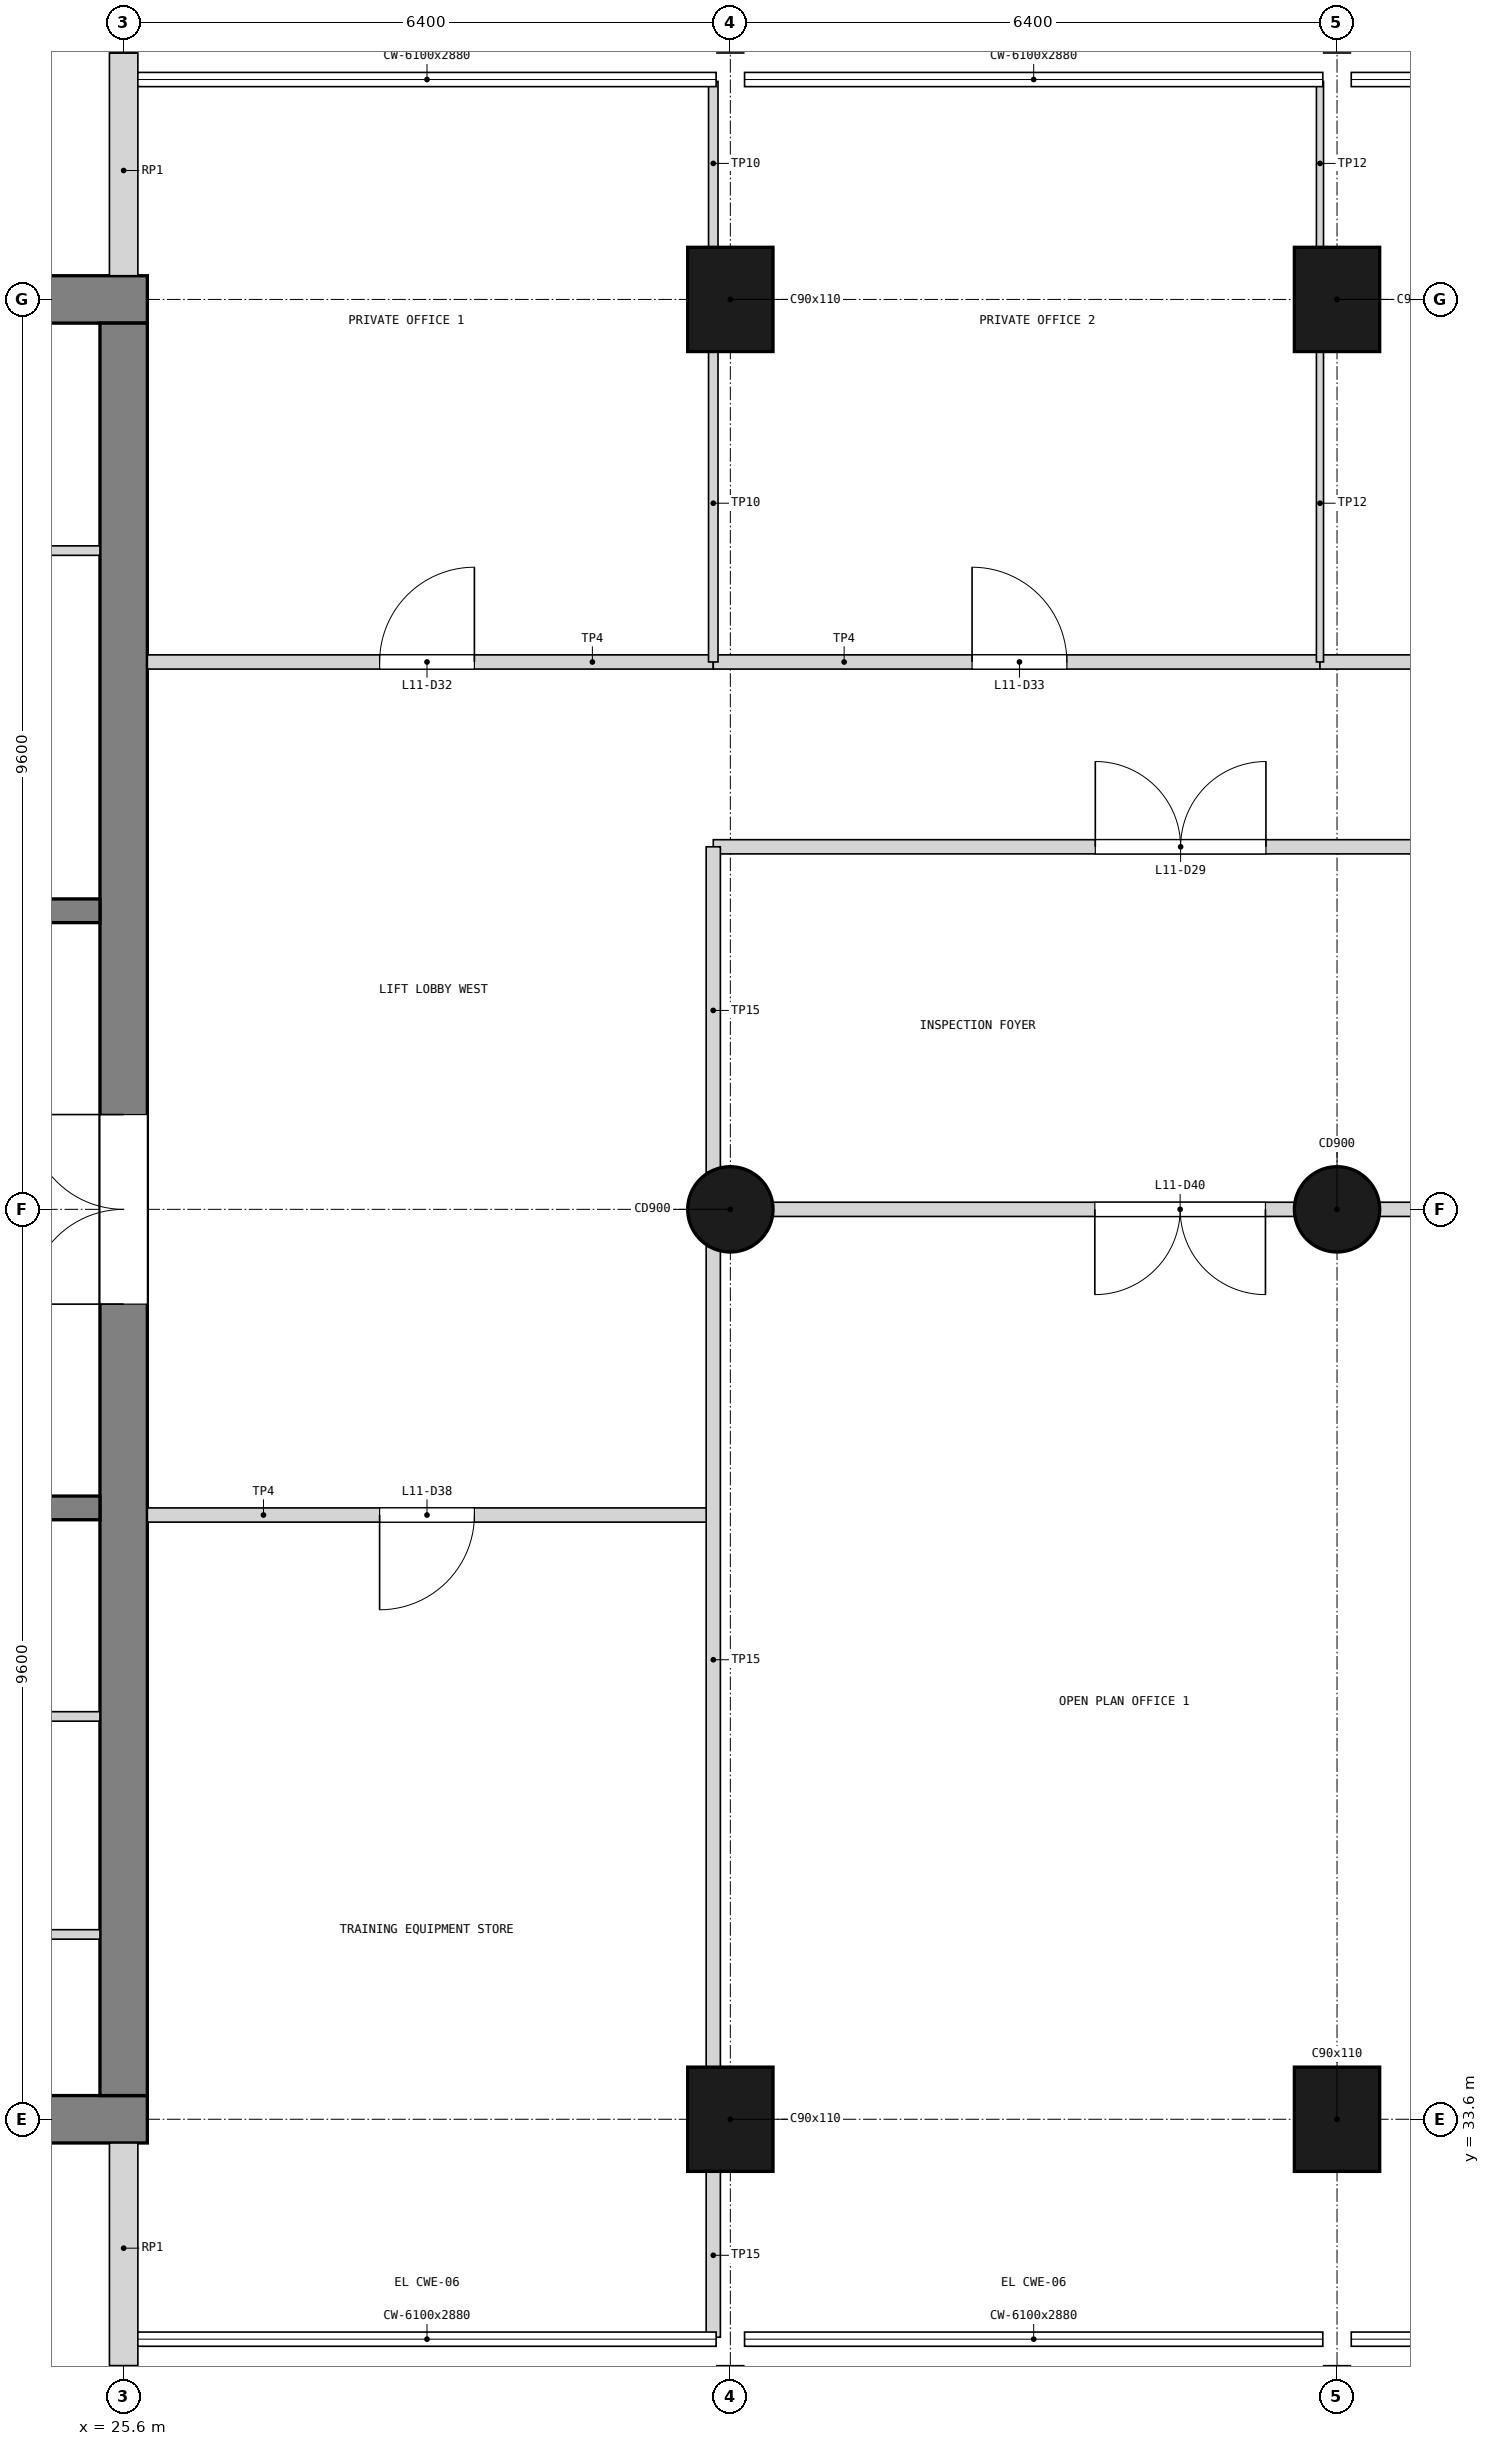
"""IFC4 building model, lengths in metres.
Left out: names, types, materials, properties, quantities, classifications, styles, units other than length and angle.
Written with IfcOpenShell. Run it as: python <this file> out.ifc"""

import sys

from ifc_helpers import new_model, si_unit, direction, frame, frame_2d, origin, origin_2d, place, context, subcontext, project, spatial, rectangle, circle, extrude, element, fill, save


model = new_model("IFC4")
c1 = context("Model", 3, precision=1e-05, world=origin(), true_north=direction((0.0, 1.0)))
c2 = subcontext(c1, "Body", "Model", "MODEL_VIEW")
j1 = project(units=[si_unit("LENGTHUNIT", "METRE"), si_unit("PLANEANGLEUNIT", "RADIAN")], contexts=[c1])
p1 = place(None, origin())
s1 = spatial("IfcSite", under=j1, at=p1, CompositionType="ELEMENT")
p2 = place(p1, origin())
s2 = spatial("IfcBuilding", under=s1, at=p2, CompositionType="ELEMENT")
p3 = place(p2, frame((0.0, 0.0, 44.4)))
s3 = spatial("IfcBuildingStorey", under=s2, at=p3, CompositionType="ELEMENT", Elevation=44.4)
p4 = place(p3, frame((12.55, 52.8, 0.0), z_axis=(0.0, 0.0, 1.0), x_axis=(1.0, 0.0, 0.0)))
e1 = element("IfcWall", 1, at=p4, inside=s3, PredefinedType="SHEAR", context=c2, shape_type="SweptSolid", body=[
    extrude(rectangle(XDim=13.3, YDim=0.5, at=frame_2d((6.65, 0.0))), origin(), (0.0, 0.0, 1.0), 3.9),
])
p5 = place(p4, frame((1.85, 0.0, 1.0)))
e2 = element("IfcOpeningElement", 2, at=p5, cuts=e1, PredefinedType="OPENING", context=c2, shape_type="SweptSolid", body=[
    extrude(rectangle(XDim=0.4, YDim=2.0, at=frame_2d((0.2, 1.0))), frame((0.0, 0.26, 0.0), z_axis=(0.0, -1.0, 0.0), x_axis=(1.0, 0.0, 0.0)), (0.0, 0.0, 1.0), 0.52),
])
p6 = place(p3, frame((12.55, 33.6, 0.0), z_axis=(0.0, 0.0, 1.0), x_axis=(1.0, 0.0, 0.0)))
e3 = element("IfcWall", 3, at=p6, inside=s3, PredefinedType="SHEAR", context=c2, shape_type="SweptSolid", body=[
    extrude(rectangle(XDim=13.3, YDim=0.5, at=frame_2d((6.65, 0.0))), origin(), (0.0, 0.0, 1.0), 3.9),
])
p7 = place(p6, frame((1.85, 0.0, 1.0)))
e4 = element("IfcOpeningElement", 4, at=p7, cuts=e3, PredefinedType="OPENING", context=c2, shape_type="SweptSolid", body=[
    extrude(rectangle(XDim=0.4, YDim=2.0, at=frame_2d((0.2, 1.0))), frame((0.0, 0.26, 0.0), z_axis=(0.0, -1.0, 0.0), x_axis=(1.0, 0.0, 0.0)), (0.0, 0.0, 1.0), 0.52),
])
p8 = place(p3, frame((25.6, 33.85, 0.0), z_axis=(0.0, 0.0, 1.0), x_axis=(0.0, 1.0, 0.0)))
e5 = element("IfcWall", 5, at=p8, inside=s3, PredefinedType="SHEAR", context=c2, shape_type="SweptSolid", body=[
    extrude(rectangle(XDim=18.7, YDim=0.5, at=frame_2d((9.35, 0.0))), origin(), (0.0, 0.0, 1.0), 3.9),
])
p9 = place(p8, frame((8.35, 0.0, 0.0)))
e6 = element("IfcOpeningElement", 6, at=p9, cuts=e5, PredefinedType="OPENING", context=c2, shape_type="SweptSolid", body=[
    extrude(rectangle(XDim=2.0, YDim=2.1, at=frame_2d((1.0, 1.05))), frame((0.0, 0.26, 0.0), z_axis=(0.0, -1.0, 0.0), x_axis=(1.0, 0.0, 0.0)), (0.0, 0.0, 1.0), 0.52),
])
p10 = place(p3, frame((32.0, 33.6, 0.0), z_axis=(0.0, 0.0, 1.0), x_axis=(1.0, 0.0, 0.0)))
e7 = element("IfcColumn", 7, at=p10, inside=s3, PredefinedType="COLUMN", context=c2, shape_type="SweptSolid", body=[
    extrude(rectangle(XDim=0.9, YDim=1.1, at=origin_2d()), origin(), (0.0, 0.0, 1.0), 3.9),
])
p11 = place(p3, frame((32.0, 43.2, 0.0), z_axis=(0.0, 0.0, 1.0), x_axis=(1.0, 0.0, 0.0)))
e8 = element("IfcColumn", 8, at=p11, inside=s3, PredefinedType="COLUMN", context=c2, shape_type="SweptSolid", body=[
    extrude(circle(Radius=0.45, at=origin_2d()), origin(), (0.0, 0.0, 1.0), 3.9),
])
for number, where, z_axis, x_axis in (
    (9, (32.0, 52.8, 0.0), (0.0, 0.0, 1.0), (1.0, 0.0, 0.0)),
    (10, (38.4, 33.6, 0.0), (0.0, 0.0, 1.0), (1.0, 0.0, 0.0)),
):
    element("IfcColumn", number, at=place(p3, frame(where, z_axis=z_axis, x_axis=x_axis)), inside=s3, PredefinedType="COLUMN", context=c2, shape_type="SweptSolid", body=[
        extrude(rectangle(XDim=0.9, YDim=1.1, at=origin_2d()), origin(), (0.0, 0.0, 1.0), 3.9),
    ])
p12 = place(p3, frame((38.4, 43.2, 0.0), z_axis=(0.0, 0.0, 1.0), x_axis=(1.0, 0.0, 0.0)))
e11 = element("IfcColumn", 11, at=p12, inside=s3, PredefinedType="COLUMN", context=c2, shape_type="SweptSolid", body=[
    extrude(circle(Radius=0.45, at=origin_2d()), origin(), (0.0, 0.0, 1.0), 3.9),
])
p13 = place(p3, frame((38.4, 52.8, 0.0), z_axis=(0.0, 0.0, 1.0), x_axis=(1.0, 0.0, 0.0)))
e12 = element("IfcColumn", 12, at=p13, inside=s3, PredefinedType="COLUMN", context=c2, shape_type="SweptSolid", body=[
    extrude(rectangle(XDim=0.9, YDim=1.1, at=origin_2d()), origin(), (0.0, 0.0, 1.0), 3.9),
])
p14 = place(p3, frame((25.6, 31.0, 0.0), z_axis=(0.0, 0.0, 1.0), x_axis=(0.0, 1.0, 0.0)))
e13 = element("IfcWall", 13, at=p14, inside=s3, PredefinedType="SOLIDWALL", context=c2, shape_type="SweptSolid", body=[
    extrude(rectangle(XDim=2.35, YDim=0.3, at=frame_2d((1.175, 0.0))), origin(), (0.0, 0.0, 1.0), 2.88),
])
p15 = place(p3, frame((25.6, 53.05, 0.0), z_axis=(0.0, 0.0, 1.0), x_axis=(0.0, 1.0, 0.0)))
e14 = element("IfcWall", 14, at=p15, inside=s3, PredefinedType="SOLIDWALL", context=c2, shape_type="SweptSolid", body=[
    extrude(rectangle(XDim=2.35, YDim=0.3, at=frame_2d((1.175, 0.0))), origin(), (0.0, 0.0, 1.0), 2.88),
])
for number, where, z_axis, x_axis in (
    (15, (19.875, 40.05, 0.0), (0.0, 0.0, 1.0), (1.0, 0.0, 0.0)),
    (16, (19.875, 46.35, 0.0), (0.0, 0.0, 1.0), (1.0, 0.0, 0.0)),
):
    element("IfcWall", number, at=place(p3, frame(where, z_axis=z_axis, x_axis=x_axis)), inside=s3, PredefinedType="SOLIDWALL", context=c2, shape_type="SweptSolid", body=[
        extrude(rectangle(XDim=5.475, YDim=0.25, at=frame_2d((2.738, 0.0))), origin(), (0.0, 0.0, 1.0), 3.6),
    ])
p16 = place(p3, frame((20.125, 35.55, 0.0), z_axis=(0.0, 0.0, 1.0), x_axis=(1.0, 0.0, 0.0)))
e17 = element("IfcWall", 17, at=p16, inside=s3, PredefinedType="PARTITIONING", context=c2, shape_type="SweptSolid", body=[
    extrude(rectangle(XDim=5.225, YDim=0.1, at=frame_2d((2.613, 0.0))), origin(), (0.0, 0.0, 1.0), 3.6),
])
p17 = place(p3, frame((21.675, 37.85, 0.0), z_axis=(0.0, 0.0, 1.0), x_axis=(1.0, 0.0, 0.0)))
e18 = element("IfcWall", 18, at=p17, inside=s3, PredefinedType="PARTITIONING", context=c2, shape_type="SweptSolid", body=[
    extrude(rectangle(XDim=3.675, YDim=0.1, at=frame_2d((1.837, 0.0))), origin(), (0.0, 0.0, 1.0), 3.6),
])
p18 = place(p3, frame((20.125, 50.15, 0.0), z_axis=(0.0, 0.0, 1.0), x_axis=(1.0, 0.0, 0.0)))
e19 = element("IfcWall", 19, at=p18, inside=s3, PredefinedType="PARTITIONING", context=c2, shape_type="SweptSolid", body=[
    extrude(rectangle(XDim=5.225, YDim=0.1, at=frame_2d((2.613, 0.0))), origin(), (0.0, 0.0, 1.0), 3.6),
])
p19 = place(p3, frame((31.82, 47.025, 0.0), z_axis=(0.0, 0.0, 1.0), x_axis=(1.0, 0.0, 0.0)))
e20 = element("IfcWall", 20, at=p19, inside=s3, PredefinedType="PARTITIONING", context=c2, shape_type="SweptSolid", body=[
    extrude(rectangle(XDim=19.56, YDim=0.15, at=frame_2d((9.78, 0.0))), origin(), (0.0, 0.0, 1.0), 3.68),
])
p20 = place(p19, frame((4.03, 0.0, 0.0)))
e21 = element("IfcOpeningElement", 21, at=p20, cuts=e20, PredefinedType="OPENING", context=c2, shape_type="SweptSolid", body=[
    extrude(rectangle(XDim=1.8, YDim=2.1, at=frame_2d((0.9, 1.05))), frame((0.0, 0.085, 0.0), z_axis=(0.0, -1.0, 0.0), x_axis=(1.0, 0.0, 0.0)), (0.0, 0.0, 1.0), 0.17),
])
p21 = place(p19, frame((13.73, 0.0, 0.0)))
e22 = element("IfcOpeningElement", 22, at=p21, cuts=e20, PredefinedType="OPENING", context=c2, shape_type="SweptSolid", body=[
    extrude(rectangle(XDim=1.8, YDim=2.1, at=frame_2d((0.9, 1.05))), frame((0.0, 0.085, 0.0), z_axis=(0.0, -1.0, 0.0), x_axis=(1.0, 0.0, 0.0)), (0.0, 0.0, 1.0), 0.17),
])
p22 = place(p3, frame((25.85, 48.975, 0.0), z_axis=(0.0, 0.0, 1.0), x_axis=(1.0, 0.0, 0.0)))
e23 = element("IfcWall", 23, at=p22, inside=s3, PredefinedType="PARTITIONING", context=c2, shape_type="SweptSolid", body=[
    extrude(rectangle(XDim=5.97, YDim=0.15, at=frame_2d((2.985, 0.0))), origin(), (0.0, 0.0, 1.0), 3.68),
])
p23 = place(p22, frame((2.45, 0.0, 0.0)))
e24 = element("IfcOpeningElement", 24, at=p23, cuts=e23, PredefinedType="OPENING", context=c2, shape_type="SweptSolid", body=[
    extrude(rectangle(XDim=1.0, YDim=2.1, at=frame_2d((0.5, 1.05))), frame((0.0, 0.085, 0.0), z_axis=(0.0, -1.0, 0.0), x_axis=(1.0, 0.0, 0.0)), (0.0, 0.0, 1.0), 0.17),
])
p24 = place(p3, frame((31.82, 48.975, 0.0), z_axis=(0.0, 0.0, 1.0), x_axis=(1.0, 0.0, 0.0)))
e25 = element("IfcWall", 25, at=p24, inside=s3, PredefinedType="PARTITIONING", context=c2, shape_type="SweptSolid", body=[
    extrude(rectangle(XDim=6.4, YDim=0.15, at=frame_2d((3.2, 0.0))), origin(), (0.0, 0.0, 1.0), 3.68),
])
p25 = place(p24, frame((2.73, 0.0, 0.0)))
e26 = element("IfcOpeningElement", 26, at=p25, cuts=e25, PredefinedType="OPENING", context=c2, shape_type="SweptSolid", body=[
    extrude(rectangle(XDim=1.0, YDim=2.1, at=frame_2d((0.5, 1.05))), frame((0.0, 0.085, 0.0), z_axis=(0.0, -1.0, 0.0), x_axis=(1.0, 0.0, 0.0)), (0.0, 0.0, 1.0), 0.17),
])
p26 = place(p3, frame((38.22, 48.975, 0.0), z_axis=(0.0, 0.0, 1.0), x_axis=(1.0, 0.0, 0.0)))
e27 = element("IfcWall", 27, at=p26, inside=s3, PredefinedType="PARTITIONING", context=c2, shape_type="SweptSolid", body=[
    extrude(rectangle(XDim=6.4, YDim=0.15, at=frame_2d((3.2, 0.0))), origin(), (0.0, 0.0, 1.0), 3.68),
])
p27 = place(p26, frame((2.68, 0.0, 0.0)))
e28 = element("IfcOpeningElement", 28, at=p27, cuts=e27, PredefinedType="OPENING", context=c2, shape_type="SweptSolid", body=[
    extrude(rectangle(XDim=1.0, YDim=2.1, at=frame_2d((0.5, 1.05))), frame((0.0, 0.085, 0.0), z_axis=(0.0, -1.0, 0.0), x_axis=(1.0, 0.0, 0.0)), (0.0, 0.0, 1.0), 0.17),
])
p28 = place(p3, frame((31.82, 48.975, 0.0), z_axis=(0.0, 0.0, 1.0), x_axis=(0.0, 1.0, 0.0)))
e29 = element("IfcWall", 29, at=p28, inside=s3, PredefinedType="PARTITIONING", context=c2, shape_type="SweptSolid", body=[
    extrude(rectangle(XDim=3.295, YDim=0.1, at=frame_2d((1.647, 0.0))), origin(), (0.0, 0.0, 1.0), 2.78),
])
p29 = place(p3, frame((31.82, 53.33, 0.0), z_axis=(0.0, 0.0, 1.0), x_axis=(0.0, 1.0, 0.0)))
e30 = element("IfcWall", 30, at=p29, inside=s3, PredefinedType="PARTITIONING", context=c2, shape_type="SweptSolid", body=[
    extrude(rectangle(XDim=1.77, YDim=0.1, at=frame_2d((0.885, 0.0))), origin(), (0.0, 0.0, 1.0), 2.78),
])
p30 = place(p3, frame((38.22, 48.975, 0.0), z_axis=(0.0, 0.0, 1.0), x_axis=(0.0, 1.0, 0.0)))
e31 = element("IfcWall", 31, at=p30, inside=s3, PredefinedType="PARTITIONING", context=c2, shape_type="SweptSolid", body=[
    extrude(rectangle(XDim=3.295, YDim=0.075, at=frame_2d((1.647, 0.0))), origin(), (0.0, 0.0, 1.0), 2.78),
])
p31 = place(p3, frame((38.22, 53.33, 0.0), z_axis=(0.0, 0.0, 1.0), x_axis=(0.0, 1.0, 0.0)))
e32 = element("IfcWall", 32, at=p31, inside=s3, PredefinedType="PARTITIONING", context=c2, shape_type="SweptSolid", body=[
    extrude(rectangle(XDim=1.77, YDim=0.075, at=frame_2d((0.885, 0.0))), origin(), (0.0, 0.0, 1.0), 2.78),
])
p32 = place(p3, frame((31.82, 43.2, 0.0), z_axis=(0.0, 0.0, 1.0), x_axis=(1.0, 0.0, 0.0)))
e33 = element("IfcWall", 33, at=p32, inside=s3, PredefinedType="PARTITIONING", context=c2, shape_type="SweptSolid", body=[
    extrude(rectangle(XDim=25.96, YDim=0.15, at=frame_2d((12.98, 0.0))), origin(), (0.0, 0.0, 1.0), 2.88),
])
p33 = place(p32, frame((4.025, 0.0, 0.0)))
e34 = element("IfcOpeningElement", 34, at=p33, cuts=e33, PredefinedType="OPENING", context=c2, shape_type="SweptSolid", body=[
    extrude(rectangle(XDim=1.8, YDim=2.1, at=frame_2d((0.9, 1.05))), frame((0.0, 0.085, 0.0), z_axis=(0.0, -1.0, 0.0), x_axis=(1.0, 0.0, 0.0)), (0.0, 0.0, 1.0), 0.17),
])
p34 = place(p32, frame((10.43, 0.0, 0.0)))
e35 = element("IfcOpeningElement", 35, at=p34, cuts=e33, PredefinedType="OPENING", context=c2, shape_type="SweptSolid", body=[
    extrude(rectangle(XDim=1.8, YDim=2.1, at=frame_2d((0.9, 1.05))), frame((0.0, 0.085, 0.0), z_axis=(0.0, -1.0, 0.0), x_axis=(1.0, 0.0, 0.0)), (0.0, 0.0, 1.0), 0.17),
])
p35 = place(p32, frame((17.38, 0.0, 0.0)))
e36 = element("IfcOpeningElement", 36, at=p35, cuts=e33, PredefinedType="OPENING", context=c2, shape_type="SweptSolid", body=[
    extrude(rectangle(XDim=1.0, YDim=2.1, at=frame_2d((0.5, 1.05))), frame((0.0, 0.085, 0.0), z_axis=(0.0, -1.0, 0.0), x_axis=(1.0, 0.0, 0.0)), (0.0, 0.0, 1.0), 0.17),
])
p36 = place(p3, frame((25.85, 39.975, 0.0), z_axis=(0.0, 0.0, 1.0), x_axis=(1.0, 0.0, 0.0)))
e37 = element("IfcWall", 37, at=p36, inside=s3, PredefinedType="PARTITIONING", context=c2, shape_type="SweptSolid", body=[
    extrude(rectangle(XDim=5.97, YDim=0.15, at=frame_2d((2.985, 0.0))), origin(), (0.0, 0.0, 1.0), 3.68),
])
p37 = place(p36, frame((2.45, 0.0, 0.0)))
e38 = element("IfcOpeningElement", 38, at=p37, cuts=e37, PredefinedType="OPENING", context=c2, shape_type="SweptSolid", body=[
    extrude(rectangle(XDim=1.0, YDim=2.1, at=frame_2d((0.5, 1.05))), frame((0.0, 0.085, 0.0), z_axis=(0.0, -1.0, 0.0), x_axis=(1.0, 0.0, 0.0)), (0.0, 0.0, 1.0), 0.17),
])
p38 = place(p3, frame((31.82, 31.3, 0.0), z_axis=(0.0, 0.0, 1.0), x_axis=(0.0, 1.0, 0.0)))
e39 = element("IfcWall", 39, at=p38, inside=s3, PredefinedType="PARTITIONING", context=c2, shape_type="SweptSolid", body=[
    extrude(rectangle(XDim=1.77, YDim=0.15, at=frame_2d((0.885, 0.0))), origin(), (0.0, 0.0, 1.0), 2.78),
])
p39 = place(p3, frame((31.82, 34.13, 0.0), z_axis=(0.0, 0.0, 1.0), x_axis=(0.0, 1.0, 0.0)))
e40 = element("IfcWall", 40, at=p39, inside=s3, PredefinedType="PARTITIONING", context=c2, shape_type="SweptSolid", body=[
    extrude(rectangle(XDim=8.678, YDim=0.15, at=frame_2d((4.339, 0.0))), origin(), (0.0, 0.0, 1.0), 2.78),
])
p40 = place(p3, frame((31.82, 43.592, 0.0), z_axis=(0.0, 0.0, 1.0), x_axis=(0.0, 1.0, 0.0)))
e41 = element("IfcWall", 41, at=p40, inside=s3, PredefinedType="PARTITIONING", context=c2, shape_type="SweptSolid", body=[
    extrude(rectangle(XDim=3.433, YDim=0.15, at=frame_2d((1.716, 0.0))), origin(), (0.0, 0.0, 1.0), 2.78),
])
p41 = place(p9, origin())
e42 = element("IfcDoor", 42, at=p41, inside=s3, OperationType="DOUBLE_DOOR_SINGLE_SWING", PredefinedType="DOOR", context=c2, shape_type="SweptSolid", body=[
    extrude(rectangle(XDim=2.0, YDim=2.1, at=frame_2d((1.0, 1.05))), frame((0.0, 0.025, 0.0), z_axis=(0.0, -1.0, 0.0), x_axis=(1.0, 0.0, 0.0)), (0.0, 0.0, 1.0), 0.05),
])
fill(e6, e42)
p42 = place(p20, origin())
e43 = element("IfcDoor", 43, at=p42, inside=s3, OperationType="DOUBLE_DOOR_SINGLE_SWING", PredefinedType="DOOR", context=c2, shape_type="SweptSolid", body=[
    extrude(rectangle(XDim=1.8, YDim=2.1, at=frame_2d((0.9, 1.05))), frame((0.0, 0.025, 0.0), z_axis=(0.0, -1.0, 0.0), x_axis=(1.0, 0.0, 0.0)), (0.0, 0.0, 1.0), 0.05),
])
fill(e21, e43)
p43 = place(p23, origin())
e44 = element("IfcDoor", 44, at=p43, inside=s3, OperationType="SINGLE_SWING_RIGHT", PredefinedType="DOOR", context=c2, shape_type="SweptSolid", body=[
    extrude(rectangle(XDim=1.0, YDim=2.1, at=frame_2d((0.5, 1.05))), frame((0.0, 0.025, 0.0), z_axis=(0.0, -1.0, 0.0), x_axis=(1.0, 0.0, 0.0)), (0.0, 0.0, 1.0), 0.05),
])
fill(e24, e44)
p44 = place(p25, origin())
e45 = element("IfcDoor", 45, at=p44, inside=s3, OperationType="SINGLE_SWING_LEFT", PredefinedType="DOOR", context=c2, shape_type="SweptSolid", body=[
    extrude(rectangle(XDim=1.0, YDim=2.1, at=frame_2d((0.5, 1.05))), frame((0.0, 0.025, 0.0), z_axis=(0.0, -1.0, 0.0), x_axis=(1.0, 0.0, 0.0)), (0.0, 0.0, 1.0), 0.05),
])
fill(e26, e45)
p45 = place(p37, frame((1.0, 0.0, 0.0), z_axis=(0.0, 0.0, 1.0), x_axis=(-1.0, 0.0, 0.0)))
e46 = element("IfcDoor", 46, at=p45, inside=s3, OperationType="SINGLE_SWING_RIGHT", PredefinedType="DOOR", context=c2, shape_type="SweptSolid", body=[
    extrude(rectangle(XDim=1.0, YDim=2.1, at=frame_2d((0.5, 1.05))), frame((0.0, 0.025, 0.0), z_axis=(0.0, -1.0, 0.0), x_axis=(1.0, 0.0, 0.0)), (0.0, 0.0, 1.0), 0.05),
])
fill(e38, e46)
p46 = place(p33, frame((1.8, 0.0, 0.0), z_axis=(0.0, 0.0, 1.0), x_axis=(-1.0, 0.0, 0.0)))
e47 = element("IfcDoor", 47, at=p46, inside=s3, OperationType="DOUBLE_DOOR_SINGLE_SWING", PredefinedType="DOOR", context=c2, shape_type="SweptSolid", body=[
    extrude(rectangle(XDim=1.8, YDim=2.1, at=frame_2d((0.9, 1.05))), frame((0.0, 0.025, 0.0), z_axis=(0.0, -1.0, 0.0), x_axis=(1.0, 0.0, 0.0)), (0.0, 0.0, 1.0), 0.05),
])
fill(e34, e47)
save(model, sys.argv[1])
